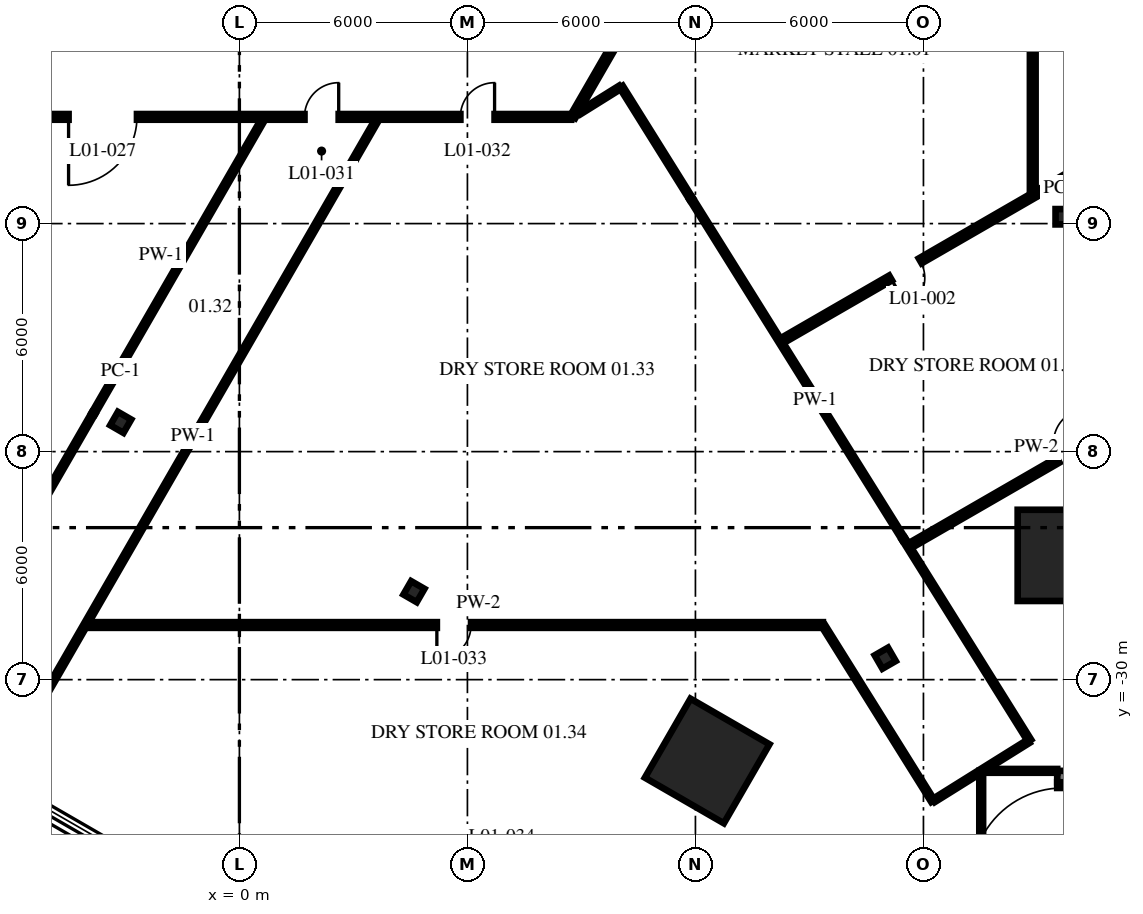
"""IFC4 building model, lengths in metres.
Left out: names, types, materials, properties, quantities, classifications, styles, units other than length and angle.
Written with IfcOpenShell. Run it as: python <this file> out.ifc"""

import sys

from ifc_helpers import new_model, si_unit, direction, frame, frame_2d, origin, origin_2d, place, context, subcontext, project, spatial, rectangle, i_section, extrude, source, transform, mapped, element, fill, save


model = new_model("IFC4")
c1 = context("Model", 3, precision=1e-05, world=origin(), true_north=direction((0.0, 1.0)))
c2 = subcontext(c1, "Body", "Model", "MODEL_VIEW")
j1 = project(units=[si_unit("LENGTHUNIT", "METRE"), si_unit("PLANEANGLEUNIT", "RADIAN")], contexts=[c1])
p1 = place(None, origin())
s1 = spatial("IfcSite", under=j1, at=p1, CompositionType="ELEMENT")
p2 = place(p1, origin())
s2 = spatial("IfcBuilding", under=s1, at=p2, CompositionType="ELEMENT")
p3 = place(p2, frame((0.0, 0.0, 7.0)))
s3 = spatial("IfcBuildingStorey", under=s2, at=p3, CompositionType="ELEMENT", Elevation=7.0)
m1 = source(origin(), c2, "Body", "SweptSolid", [
    extrude(rectangle(XDim=2.4, YDim=2.4, at=origin_2d()), origin(), (0.0, 0.0, 1.0), 4.5),
])
p4 = place(p3, frame((21.679, -26.73, 0.0), z_axis=(0.0, 0.0, 1.0), x_axis=(0.0, 1.0, 0.0)))
e1 = element("IfcColumn", 1, at=p4, inside=s3, PredefinedType="COLUMN", context=c2, shape_type="MappedRepresentation", body=[
    mapped(m1, transform((0.0, 0.0, 0.0), scale=1.0)),
])
m2 = source(origin(), c2, "Body", "SweptSolid", [
    extrude(i_section(OverallWidth=0.404, OverallDepth=0.406, WebThickness=0.027, FlangeThickness=0.044, at=origin_2d()), origin(), (0.0, 0.0, 1.0), 4.5),
])
for number, where, z_axis, x_axis in (
    (2, (21.679, -17.82, 0.0), (0.0, 0.0, 1.0), (0.0, 1.0, 0.0)),
    (3, (-3.124, -23.23, 0.0), (0.0, 0.0, 1.0), (0.866, -0.5, 0.0)),
    (4, (4.593, -27.685, 0.0), (0.0, 0.0, 1.0), (0.866, -0.5, 0.0)),
):
    element("IfcColumn", number, at=place(p3, frame(where, z_axis=z_axis, x_axis=x_axis)), inside=s3, PredefinedType="COLUMN", context=c2, shape_type="MappedRepresentation", body=[
        mapped(m2, transform((0.0, 0.0, 0.0), scale=1.0)),
    ])
p5 = place(p3, frame((12.309, -32.14, 0.0), z_axis=(0.0, 0.0, 1.0), x_axis=(0.866025403784, -0.5, 0.0)))
e5 = element("IfcColumn", 5, at=p5, inside=s3, PredefinedType="COLUMN", context=c2, shape_type="MappedRepresentation", body=[
    mapped(m1, transform((0.0, 0.0, 0.0), scale=1.0)),
])
p6 = place(p3, frame((16.994, -29.435, 0.0), z_axis=(0.0, 0.0, 1.0), x_axis=(0.866026276448, 0.4999984885, 0.0)))
e6 = element("IfcColumn", 6, at=p6, inside=s3, PredefinedType="COLUMN", context=c2, shape_type="MappedRepresentation", body=[
    mapped(m2, transform((0.0, 0.0, 0.0), scale=1.0)),
])
m3 = source(origin(), c2, "Body", "SweptSolid", [
    extrude(rectangle(XDim=10.3, YDim=0.3, at=frame_2d((5.15, 0.0))), origin(), (0.0, 0.0, 1.0), 4.3),
])
p7 = place(p3, frame((21.67, -43.0, 0.0), z_axis=(0.0, 0.0, 1.0), x_axis=(0.0, 1.0, 0.0)))
e7 = element("IfcWall", 7, at=p7, inside=s3, PredefinedType="SHEAR", context=c2, shape_type="MappedRepresentation", body=[
    mapped(m3, transform((0.0, 0.0, 0.0), scale=1.0)),
])
p8 = place(p7, frame((7.75, 0.0, 0.0)))
e8 = element("IfcOpeningElement", 8, at=p8, cuts=e7, PredefinedType="OPENING", context=c2, shape_type="SweptSolid", body=[
    extrude(rectangle(XDim=2.4, YDim=2.1, at=frame_2d((1.2, 1.05))), frame((0.0, 0.16, 0.0), z_axis=(0.0, -1.0, 0.0), x_axis=(1.0, 0.0, 0.0)), (0.0, 0.0, 1.0), 0.32),
])
m4 = source(origin(), c2, "Body", "SweptSolid", [
    extrude(rectangle(XDim=6.26, YDim=0.3, at=frame_2d((3.13, 0.0))), origin(), (0.0, 0.0, 1.0), 4.3),
])
p9 = place(p3, frame((21.52, -32.55, 0.0), z_axis=(0.0, 0.0, 1.0), x_axis=(1.0, 0.0, 0.0)))
e9 = element("IfcWall", 9, at=p9, inside=s3, PredefinedType="SHEAR", context=c2, shape_type="MappedRepresentation", body=[
    mapped(m4, transform((0.0, 0.0, 0.0), scale=1.0)),
])
p10 = place(p3, frame((15.375, -28.596, 0.0), z_axis=(0.0, 0.0, 1.0), x_axis=(0.529768228728, -0.848142454916, 0.0)))
e10 = element("IfcWall", 10, at=p10, inside=s3, PredefinedType="PARTITIONING", context=c2, shape_type="SweptSolid", body=[
    extrude(rectangle(XDim=5.422, YDim=0.1, at=frame_2d((2.711, 0.0))), origin(), (0.0, 0.0, 1.0), 4.3),
])
p11 = place(p3, frame((10.043, -14.398, 0.0), z_axis=(0.0, 0.0, 1.0), x_axis=(0.529778164717, -0.8481362486, 0.0)))
e11 = element("IfcWall", 11, at=p11, inside=s3, PredefinedType="PARTITIONING", context=c2, shape_type="SweptSolid", body=[
    extrude(rectangle(XDim=3.479, YDim=0.1, at=frame_2d((1.74, 0.0))), origin(), (0.0, 0.0, 1.0), 4.3),
])
p12 = place(p3, frame((11.887, -17.349, 0.0), z_axis=(0.0, 0.0, 1.0), x_axis=(0.529793111174, -0.848126912291, 0.0)))
e12 = element("IfcWall", 12, at=p12, inside=s3, PredefinedType="PARTITIONING", context=c2, shape_type="SweptSolid", body=[
    extrude(rectangle(XDim=10.556, YDim=0.1, at=frame_2d((5.278, 0.0))), origin(), (0.0, 0.0, 1.0), 3.543),
])
p13 = place(p3, frame((17.479, -26.302, 0.0), z_axis=(0.0, 0.0, 1.0), x_axis=(0.52978836467, -0.848129877236, 0.0)))
e13 = element("IfcWall", 13, at=p13, inside=s3, PredefinedType="PARTITIONING", context=c2, shape_type="SweptSolid", body=[
    extrude(rectangle(XDim=6.253, YDim=0.1, at=frame_2d((3.127, 0.0))), origin(), (0.0, 0.0, 1.0), 4.3),
])
m5 = source(origin(), c2, "Body", "SweptSolid", [
    extrude(rectangle(XDim=1.87, YDim=0.1, at=frame_2d((0.935, 0.0))), origin(), (0.0, 0.0, 1.0), 4.3),
])
p14 = place(p3, frame((19.65, -32.4, 0.0), z_axis=(0.0, 0.0, 1.0), x_axis=(1.0, 0.0, 0.0)))
e14 = element("IfcWall", 14, at=p14, inside=s3, PredefinedType="PARTITIONING", context=c2, shape_type="MappedRepresentation", body=[
    mapped(m5, transform((0.0, 0.0, 0.0), scale=1.0)),
])
p15 = place(p3, frame((-3.974, -28.562, 0.0), z_axis=(0.0, 0.0, 1.0), x_axis=(1.0, 0.0, 0.0)))
e15 = element("IfcWall", 15, at=p15, inside=s3, PredefinedType="PARTITIONING", context=c2, shape_type="SweptSolid", body=[
    extrude(rectangle(XDim=19.328, YDim=0.15, at=frame_2d((9.664, 0.0))), origin(), (0.0, 0.0, 1.0), 4.3),
])
p16 = place(p15, frame((9.17, 0.0, 0.0)))
e16 = element("IfcOpeningElement", 16, at=p16, cuts=e15, PredefinedType="OPENING", context=c2, shape_type="SweptSolid", body=[
    extrude(rectangle(XDim=0.9, YDim=2.1, at=frame_2d((0.45, 1.05))), frame((0.0, 0.085, 0.0), z_axis=(0.0, -1.0, 0.0), x_axis=(1.0, 0.0, 0.0)), (0.0, 0.0, 1.0), 0.17),
])
p17 = place(p3, frame((-8.721, -15.192, 0.0), z_axis=(0.0, 0.0, 1.0), x_axis=(1.0, 0.0, 0.0)))
e17 = element("IfcWall", 17, at=p17, inside=s3, PredefinedType="PARTITIONING", context=c2, shape_type="SweptSolid", body=[
    extrude(rectangle(XDim=17.451, YDim=0.15, at=frame_2d((8.725, 0.0))), origin(), (0.0, 0.0, 1.0), 4.3),
])
p18 = place(p17, frame((4.226, 0.0, 0.0)))
e18 = element("IfcOpeningElement", 18, at=p18, cuts=e17, PredefinedType="OPENING", context=c2, shape_type="SweptSolid", body=[
    extrude(rectangle(XDim=1.8, YDim=2.4, at=frame_2d((0.9, 1.2))), frame((0.0, 0.085, 0.0), z_axis=(0.0, -1.0, 0.0), x_axis=(1.0, 0.0, 0.0)), (0.0, 0.0, 1.0), 0.17),
])
p19 = place(p17, frame((10.434, 0.0, 0.0)))
e19 = element("IfcOpeningElement", 19, at=p19, cuts=e17, PredefinedType="OPENING", context=c2, shape_type="SweptSolid", body=[
    extrude(rectangle(XDim=0.9, YDim=2.1, at=frame_2d((0.45, 1.05))), frame((0.0, 0.085, 0.0), z_axis=(0.0, -1.0, 0.0), x_axis=(1.0, 0.0, 0.0)), (0.0, 0.0, 1.0), 0.17),
])
p20 = place(p17, frame((14.536, 0.0, 0.0)))
e20 = element("IfcOpeningElement", 20, at=p20, cuts=e17, PredefinedType="OPENING", context=c2, shape_type="SweptSolid", body=[
    extrude(rectangle(XDim=0.9, YDim=2.1, at=frame_2d((0.45, 1.05))), frame((0.0, 0.085, 0.0), z_axis=(0.0, -1.0, 0.0), x_axis=(1.0, 0.0, 0.0)), (0.0, 0.0, 1.0), 0.17),
])
p21 = place(p3, frame((17.628, -26.483, 0.0), z_axis=(0.0, 0.0, 1.0), x_axis=(0.866027414801, 0.499996516801, 0.0)))
e21 = element("IfcWall", 21, at=p21, inside=s3, PredefinedType="PARTITIONING", context=c2, shape_type="SweptSolid", body=[
    extrude(rectangle(XDim=8.379, YDim=0.15, at=frame_2d((4.19, 0.0))), origin(), (0.0, 0.0, 1.0), 4.3),
])
p22 = place(p21, frame((4.52, 0.0, 0.0)))
e22 = element("IfcOpeningElement", 22, at=p22, cuts=e21, PredefinedType="OPENING", context=c2, shape_type="SweptSolid", body=[
    extrude(rectangle(XDim=0.9, YDim=2.1, at=frame_2d((0.45, 1.05))), frame((0.0, 0.085, 0.0), z_axis=(0.0, -1.0, 0.0), x_axis=(1.0, 0.0, 0.0)), (0.0, 0.0, 1.0), 0.17),
])
p23 = place(p3, frame((14.26, -21.092, 0.0), z_axis=(0.0, 0.0, 1.0), x_axis=(0.866027554198, 0.499996275356, 0.0)))
e23 = element("IfcWall", 23, at=p23, inside=s3, PredefinedType="PARTITIONING", context=c2, shape_type="SweptSolid", body=[
    extrude(rectangle(XDim=12.349, YDim=0.15, at=frame_2d((6.174, 0.0))), origin(), (0.0, 0.0, 1.0), 4.3),
])
p24 = place(p23, frame((3.32, 0.0, 0.0)))
e24 = element("IfcOpeningElement", 24, at=p24, cuts=e23, PredefinedType="OPENING", context=c2, shape_type="SweptSolid", body=[
    extrude(rectangle(XDim=0.9, YDim=2.1, at=frame_2d((0.45, 1.05))), frame((0.0, 0.085, 0.0), z_axis=(0.0, -1.0, 0.0), x_axis=(1.0, 0.0, 0.0)), (0.0, 0.0, 1.0), 0.17),
])
p25 = place(p3, frame((18.272, -33.18, 0.0), z_axis=(0.0, 0.0, 1.0), x_axis=(0.848119521421, 0.529804942771, 0.0)))
e25 = element("IfcWall", 25, at=p25, inside=s3, PredefinedType="PARTITIONING", context=c2, shape_type="SweptSolid", body=[
    extrude(rectangle(XDim=2.941, YDim=0.1, at=frame_2d((1.471, 0.0))), origin(), (0.0, 0.0, 1.0), 4.3),
])
p26 = place(p3, frame((8.949, -15.081, 0.0), z_axis=(0.0, 0.0, 1.0), x_axis=(0.848139792609, 0.529772490974, 0.0)))
e26 = element("IfcWall", 26, at=p26, inside=s3, PredefinedType="PARTITIONING", context=c2, shape_type="SweptSolid", body=[
    extrude(rectangle(XDim=1.26, YDim=0.1, at=frame_2d((0.63, 0.0))), origin(), (0.0, 0.0, 1.0), 4.3),
])
p27 = place(p3, frame((8.772, -15.191, 0.0), z_axis=(0.0, 0.0, 1.0), x_axis=(0.499997184852, 0.866027029105, 0.0)))
e27 = element("IfcWall", 27, at=p27, inside=s3, PredefinedType="PARTITIONING", context=c2, shape_type="SweptSolid", body=[
    extrude(rectangle(XDim=17.539, YDim=0.15, at=frame_2d((8.769, 0.0))), origin(), (0.0, 0.0, 1.0), 4.3),
])
p28 = place(p27, frame((11.657, 0.0, 0.0)))
e28 = element("IfcOpeningElement", 28, at=p28, cuts=e27, PredefinedType="OPENING", context=c2, shape_type="SweptSolid", body=[
    extrude(rectangle(XDim=2.4, YDim=2.4, at=frame_2d((1.2, 1.2))), frame((0.0, 0.085, 0.0), z_axis=(0.0, -1.0, 0.0), x_axis=(1.0, 0.0, 0.0)), (0.0, 0.0, 1.0), 0.17),
])
m6 = source(origin(), c2, "Body", "SweptSolid", [
    extrude(rectangle(XDim=20.055, YDim=0.1, at=frame_2d((10.027, 0.0))), origin(), (0.0, 0.0, 1.0), 4.3),
])
p29 = place(p3, frame((-6.363, -32.56, 0.0), z_axis=(0.0, 0.0, 1.0), x_axis=(0.499993625742, 0.866029083933, 0.0)))
e29 = element("IfcWall", 29, at=p29, inside=s3, PredefinedType="PARTITIONING", context=c2, shape_type="MappedRepresentation", body=[
    mapped(m6, transform((0.0, 0.0, 0.0), scale=1.0)),
])
m7 = source(origin(), c2, "Body", "SweptSolid", [
    extrude(rectangle(XDim=8.491, YDim=0.1, at=frame_2d((4.245, 0.0))), origin(), (0.0, 0.0, 1.0), 3.528),
])
p30 = place(p3, frame((-8.087, -30.347, 0.0), z_axis=(0.0, 0.0, 1.0), x_axis=(0.499995411839, 0.866028052744, 0.0)))
e30 = element("IfcWall", 30, at=p30, inside=s3, PredefinedType="PARTITIONING", context=c2, shape_type="MappedRepresentation", body=[
    mapped(m7, transform((0.0, 0.0, 0.0), scale=1.0)),
])
p31 = place(p3, frame((-3.842, -22.994, 0.0), z_axis=(0.0, 0.0, 1.0), x_axis=(0.499992224644, 0.866029892842, 0.0)))
e31 = element("IfcWall", 31, at=p31, inside=s3, PredefinedType="PARTITIONING", context=c2, shape_type="SweptSolid", body=[
    extrude(rectangle(XDim=9.009, YDim=0.1, at=frame_2d((4.504, 0.0))), origin(), (0.0, 0.0, 1.0), 4.3),
])
p32 = place(p3, frame((20.876, -17.271, 0.0), z_axis=(0.0, 0.0, 1.0), x_axis=(0.0, 1.0, 0.0)))
e32 = element("IfcWall", 32, at=p32, inside=s3, PredefinedType="PARTITIONING", context=c2, shape_type="SweptSolid", body=[
    extrude(rectangle(XDim=15.771, YDim=0.15, at=frame_2d((7.886, 0.0))), origin(), (0.0, 0.0, 1.0), 4.3),
])
p33 = place(p32, frame((6.95, 0.0, 0.0)))
e33 = element("IfcOpeningElement", 33, at=p33, cuts=e32, PredefinedType="OPENING", context=c2, shape_type="SweptSolid", body=[
    extrude(rectangle(XDim=0.9, YDim=2.1, at=frame_2d((0.45, 1.05))), frame((0.0, 0.085, 0.0), z_axis=(0.0, -1.0, 0.0), x_axis=(1.0, 0.0, 0.0)), (0.0, 0.0, 1.0), 0.17),
])
p34 = place(p3, frame((19.52, -36.919, 0.0), z_axis=(0.0, 0.0, 1.0), x_axis=(0.0, 1.0, 0.0)))
e34 = element("IfcWall", 34, at=p34, inside=s3, PredefinedType="PARTITIONING", context=c2, shape_type="SweptSolid", body=[
    extrude(rectangle(XDim=4.519, YDim=0.1, at=frame_2d((2.26, 0.0))), origin(), (0.0, 0.0, 1.0), 4.3),
])
p35 = place(p8, origin())
e35 = element("IfcDoor", 35, at=p35, inside=s3, OperationType="DOUBLE_DOOR_DOUBLE_SWING", PredefinedType="DOOR", context=c2, shape_type="SweptSolid", body=[
    extrude(rectangle(XDim=2.4, YDim=2.1, at=frame_2d((1.2, 1.05))), frame((0.0, 0.025, 0.0), z_axis=(0.0, -1.0, 0.0), x_axis=(1.0, 0.0, 0.0)), (0.0, 0.0, 1.0), 0.05),
])
fill(e8, e35)
p36 = place(p24, origin())
e36 = element("IfcDoor", 36, at=p36, inside=s3, OperationType="SINGLE_SWING_RIGHT", PredefinedType="DOOR", context=c2, shape_type="SweptSolid", body=[
    extrude(rectangle(XDim=0.9, YDim=2.1, at=frame_2d((0.45, 1.05))), frame((0.0, 0.025, 0.0), z_axis=(0.0, -1.0, 0.0), x_axis=(1.0, 0.0, 0.0)), (0.0, 0.0, 1.0), 0.05),
])
fill(e24, e36)
p37 = place(p22, origin())
e37 = element("IfcDoor", 37, at=p37, inside=s3, OperationType="SINGLE_SWING_LEFT", PredefinedType="DOOR", context=c2, shape_type="SweptSolid", body=[
    extrude(rectangle(XDim=0.9, YDim=2.1, at=frame_2d((0.45, 1.05))), frame((0.0, 0.025, 0.0), z_axis=(0.0, -1.0, 0.0), x_axis=(1.0, 0.0, 0.0)), (0.0, 0.0, 1.0), 0.05),
])
fill(e22, e37)
p38 = place(p18, origin())
e38 = element("IfcDoor", 38, at=p38, inside=s3, OperationType="DOUBLE_DOOR_SINGLE_SWING", PredefinedType="DOOR", context=c2, shape_type="SweptSolid", body=[
    extrude(rectangle(XDim=1.8, YDim=2.4, at=frame_2d((0.9, 1.2))), frame((0.0, 0.025, 0.0), z_axis=(0.0, -1.0, 0.0), x_axis=(1.0, 0.0, 0.0)), (0.0, 0.0, 1.0), 0.05),
])
fill(e18, e38)
p39 = place(p19, origin())
e39 = element("IfcDoor", 39, at=p39, inside=s3, OperationType="SINGLE_SWING_LEFT", PredefinedType="DOOR", context=c2, shape_type="SweptSolid", body=[
    extrude(rectangle(XDim=0.9, YDim=2.1, at=frame_2d((0.45, 1.05))), frame((0.0, 0.025, 0.0), z_axis=(0.0, -1.0, 0.0), x_axis=(1.0, 0.0, 0.0)), (0.0, 0.0, 1.0), 0.05),
])
fill(e19, e39)
p40 = place(p20, origin())
e40 = element("IfcDoor", 40, at=p40, inside=s3, OperationType="SINGLE_SWING_LEFT", PredefinedType="DOOR", context=c2, shape_type="SweptSolid", body=[
    extrude(rectangle(XDim=0.9, YDim=2.1, at=frame_2d((0.45, 1.05))), frame((0.0, 0.025, 0.0), z_axis=(0.0, -1.0, 0.0), x_axis=(1.0, 0.0, 0.0)), (0.0, 0.0, 1.0), 0.05),
])
fill(e20, e40)
p41 = place(p16, origin())
e41 = element("IfcDoor", 41, at=p41, inside=s3, OperationType="SINGLE_SWING_RIGHT", PredefinedType="DOOR", context=c2, shape_type="SweptSolid", body=[
    extrude(rectangle(XDim=0.9, YDim=2.1, at=frame_2d((0.45, 1.05))), frame((0.0, 0.025, 0.0), z_axis=(0.0, -1.0, 0.0), x_axis=(1.0, 0.0, 0.0)), (0.0, 0.0, 1.0), 0.05),
])
fill(e16, e41)
save(model, sys.argv[1])
